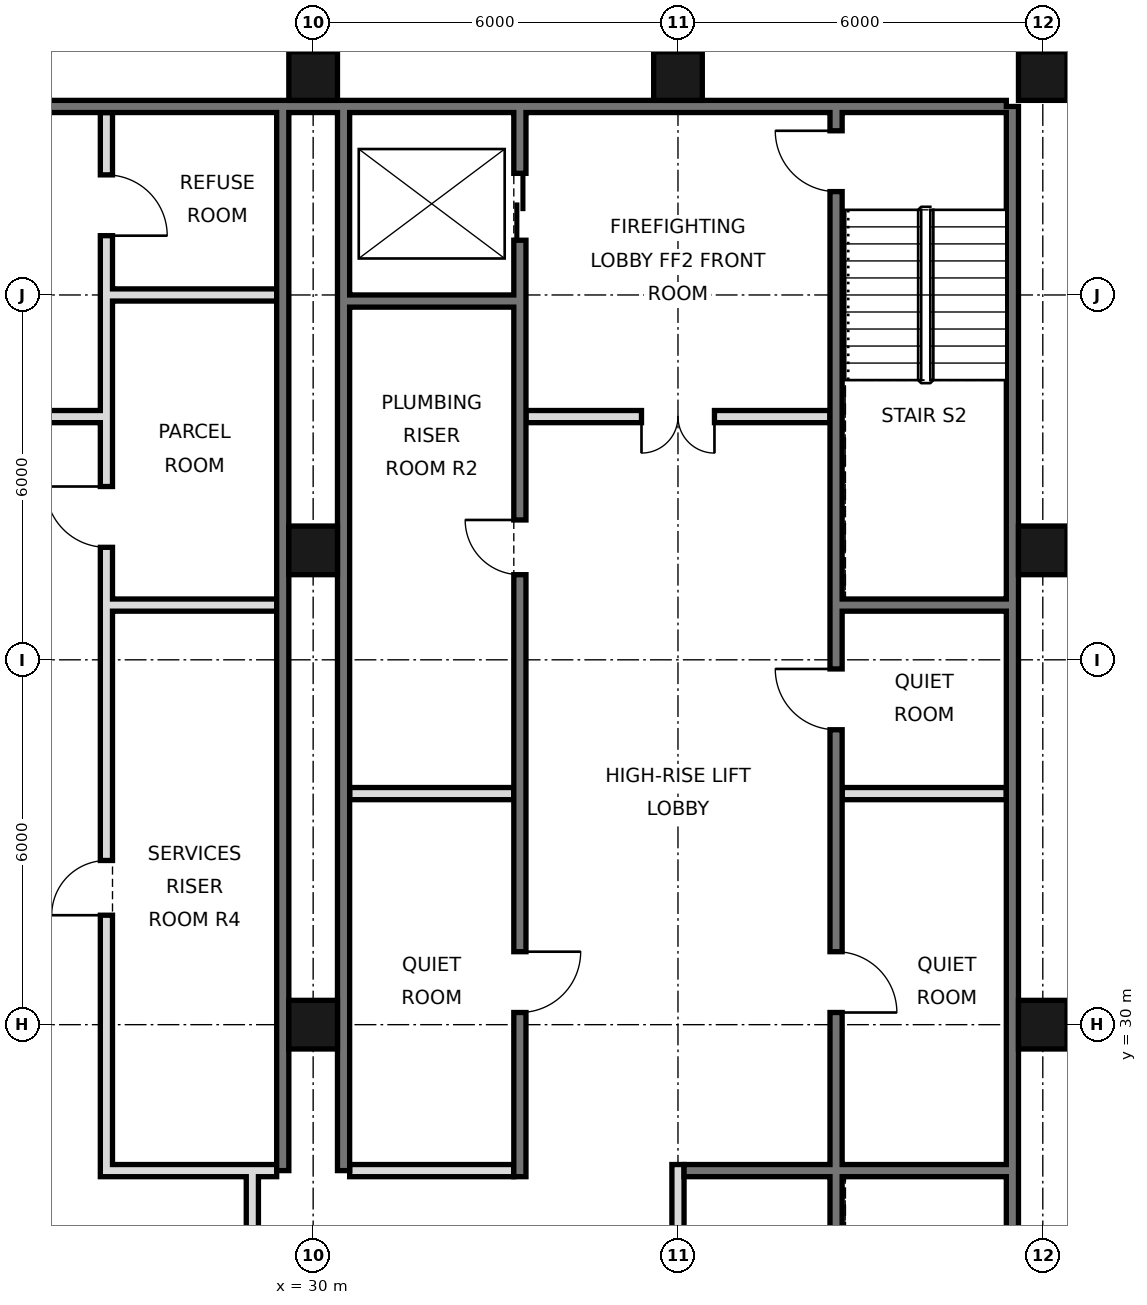
"""IFC4 building model, lengths in metres.
Left out: names, types, materials, properties, quantities, classifications, styles, units other than length and angle.
Written with IfcOpenShell. Run it as: python <this file> out.ifc"""

import sys

from ifc_helpers import new_model, si_unit, direction, frame, frame_2d, origin, origin_2d, place, context, subcontext, project, spatial, rectangle, hollow_rectangle, extrude, element, fill, save


model = new_model("IFC4")
c1 = context("Model", 3, precision=1e-05, world=origin(), true_north=direction((0.0, 1.0)))
c2 = subcontext(c1, "Body", "Model", "MODEL_VIEW")
j1 = project(units=[si_unit("LENGTHUNIT", "METRE"), si_unit("PLANEANGLEUNIT", "RADIAN")], contexts=[c1])
p1 = place(None, origin())
s1 = spatial("IfcSite", under=j1, at=p1, CompositionType="ELEMENT")
p2 = place(p1, origin())
s2 = spatial("IfcBuilding", under=s1, at=p2, CompositionType="ELEMENT")
p3 = place(p2, frame((0.0, 0.0, 123.2)))
s3 = spatial("IfcBuildingStorey", under=s2, at=p3, CompositionType="ELEMENT", Elevation=123.2)
for number, where, z_axis, x_axis in (
    (1, (30.0, 30.0, 0.0), (0.0, 0.0, 1.0), (1.0, 0.0, 0.0)),
    (2, (30.0, 37.8, 0.0), (0.0, 0.0, 1.0), (1.0, 0.0, 0.0)),
    (3, (30.0, 45.6, 0.0), (0.0, 0.0, 1.0), (1.0, 0.0, 0.0)),
    (4, (36.0, 45.6, 0.0), (0.0, 0.0, 1.0), (1.0, 0.0, 0.0)),
    (5, (42.0, 30.0, 0.0), (0.0, 0.0, 1.0), (1.0, 0.0, 0.0)),
    (6, (42.0, 37.8, 0.0), (0.0, 0.0, 1.0), (1.0, 0.0, 0.0)),
    (7, (42.0, 45.6, 0.0), (0.0, 0.0, 1.0), (1.0, 0.0, 0.0)),
):
    element("IfcColumn", number, at=place(p3, frame(where, z_axis=z_axis, x_axis=x_axis)), inside=s3, PredefinedType="COLUMN", context=c2, shape_type="SweptSolid", body=[
        extrude(hollow_rectangle(XDim=0.8, YDim=0.8, WallThickness=0.05, at=origin_2d()), origin(), (0.0, 0.0, 1.0), 3.6),
    ])
p4 = place(p3, frame((41.5, 21.6, 0.0), z_axis=(0.0, 0.0, 1.0), x_axis=(0.0, 1.0, 0.0)))
e8 = element("IfcWall", 8, at=p4, inside=s3, PredefinedType="SOLIDWALL", context=c2, shape_type="SweptSolid", body=[
    extrude(rectangle(XDim=23.5, YDim=0.2, at=frame_2d((11.75, 0.0))), origin(), (0.0, 0.0, 1.0), 3.42),
])
p5 = place(p3, frame((6.6, 45.1, 0.0), z_axis=(0.0, 0.0, 1.0), x_axis=(1.0, 0.0, 0.0)))
e9 = element("IfcWall", 9, at=p5, inside=s3, PredefinedType="SOLIDWALL", context=c2, shape_type="SweptSolid", body=[
    extrude(rectangle(XDim=34.8, YDim=0.2, at=frame_2d((17.4, 0.0))), origin(), (0.0, 0.0, 1.0), 3.42),
])
for number, where, z_axis, x_axis in (
    (10, (29.5, 27.6, 0.0), (0.0, 0.0, 1.0), (0.0, 1.0, 0.0)),
    (11, (30.5, 27.6, 0.0), (0.0, 0.0, 1.0), (0.0, 1.0, 0.0)),
):
    element("IfcWall", number, at=place(p3, frame(where, z_axis=z_axis, x_axis=x_axis)), inside=s3, PredefinedType="SOLIDWALL", context=c2, shape_type="SweptSolid", body=[
        extrude(rectangle(XDim=17.5, YDim=0.2, at=frame_2d((8.75, 0.0))), origin(), (0.0, 0.0, 1.0), 3.42),
    ])
p6 = place(p3, frame((29.0, 21.6, 0.0), z_axis=(0.0, 0.0, 1.0), x_axis=(0.0, 1.0, 0.0)))
e12 = element("IfcWall", 12, at=p6, inside=s3, PredefinedType="PARTITIONING", context=c2, shape_type="SweptSolid", body=[
    extrude(rectangle(XDim=6.0, YDim=0.2, at=frame_2d((3.0, 0.0))), origin(), (0.0, 0.0, 1.0), 3.42),
])
p7 = place(p6, frame((2.1, 0.0, 0.0)))
e13 = element("IfcOpeningElement", 13, at=p7, cuts=e12, PredefinedType="OPENING", context=c2, shape_type="SweptSolid", body=[
    extrude(rectangle(XDim=1.8, YDim=2.1, at=frame_2d((0.9, 1.05))), frame((0.0, 0.11, 0.0), z_axis=(0.0, -1.0, 0.0), x_axis=(1.0, 0.0, 0.0)), (0.0, 0.0, 1.0), 0.22),
])
p8 = place(p3, frame((26.6, 27.5, 0.0), z_axis=(0.0, 0.0, 1.0), x_axis=(0.0, 1.0, 0.0)))
e14 = element("IfcWall", 14, at=p8, inside=s3, PredefinedType="SOLIDWALL", context=c2, shape_type="SweptSolid", body=[
    extrude(rectangle(XDim=17.5, YDim=0.2, at=frame_2d((8.75, 0.0))), origin(), (0.0, 0.0, 1.0), 3.42),
])
p9 = place(p8, frame((4.3, 0.0, 0.0)))
e15 = element("IfcOpeningElement", 15, at=p9, cuts=e14, PredefinedType="OPENING", context=c2, shape_type="SweptSolid", body=[
    extrude(rectangle(XDim=0.9, YDim=2.1, at=frame_2d((0.45, 1.05))), frame((0.0, 0.11, 0.0), z_axis=(0.0, -1.0, 0.0), x_axis=(1.0, 0.0, 0.0)), (0.0, 0.0, 1.0), 0.22),
])
p10 = place(p8, frame((10.35, 0.0, 0.0)))
e16 = element("IfcOpeningElement", 16, at=p10, cuts=e14, PredefinedType="OPENING", context=c2, shape_type="SweptSolid", body=[
    extrude(rectangle(XDim=1.0, YDim=2.1, at=frame_2d((0.5, 1.05))), frame((0.0, 0.11, 0.0), z_axis=(0.0, -1.0, 0.0), x_axis=(1.0, 0.0, 0.0)), (0.0, 0.0, 1.0), 0.22),
])
p11 = place(p8, frame((15.475, 0.0, 0.0)))
e17 = element("IfcOpeningElement", 17, at=p11, cuts=e14, PredefinedType="OPENING", context=c2, shape_type="SweptSolid", body=[
    extrude(rectangle(XDim=1.0, YDim=2.1, at=frame_2d((0.5, 1.05))), frame((0.0, 0.11, 0.0), z_axis=(0.0, -1.0, 0.0), x_axis=(1.0, 0.0, 0.0)), (0.0, 0.0, 1.0), 0.22),
])
p12 = place(p3, frame((33.4, 27.5, 0.0), z_axis=(0.0, 0.0, 1.0), x_axis=(0.0, 1.0, 0.0)))
e18 = element("IfcWall", 18, at=p12, inside=s3, PredefinedType="SOLIDWALL", context=c2, shape_type="SweptSolid", body=[
    extrude(rectangle(XDim=17.5, YDim=0.2, at=frame_2d((8.75, 0.0))), origin(), (0.0, 0.0, 1.0), 3.42),
])
p13 = place(p12, frame((15.4, 0.0, 0.0)))
e19 = element("IfcOpeningElement", 19, at=p13, cuts=e18, PredefinedType="OPENING", context=c2, shape_type="SweptSolid", body=[
    extrude(rectangle(XDim=1.1, YDim=2.1, at=frame_2d((0.55, 1.05))), frame((0.0, 0.11, 0.0), z_axis=(0.0, -1.0, 0.0), x_axis=(1.0, 0.0, 0.0)), (0.0, 0.0, 1.0), 0.22),
])
p14 = place(p12, frame((2.7, 0.0, 0.0)))
e20 = element("IfcOpeningElement", 20, at=p14, cuts=e18, PredefinedType="OPENING", context=c2, shape_type="SweptSolid", body=[
    extrude(rectangle(XDim=1.0, YDim=2.1, at=frame_2d((0.5, 1.05))), frame((0.0, 0.11, 0.0), z_axis=(0.0, -1.0, 0.0), x_axis=(1.0, 0.0, 0.0)), (0.0, 0.0, 1.0), 0.22),
])
p15 = place(p12, frame((9.9, 0.0, 0.0)))
e21 = element("IfcOpeningElement", 21, at=p15, cuts=e18, PredefinedType="OPENING", context=c2, shape_type="SweptSolid", body=[
    extrude(rectangle(XDim=0.9, YDim=2.1, at=frame_2d((0.45, 1.05))), frame((0.0, 0.11, 0.0), z_axis=(0.0, -1.0, 0.0), x_axis=(1.0, 0.0, 0.0)), (0.0, 0.0, 1.0), 0.22),
])
p16 = place(p3, frame((36.0, 21.6, 0.0), z_axis=(0.0, 0.0, 1.0), x_axis=(0.0, 1.0, 0.0)))
e22 = element("IfcWall", 22, at=p16, inside=s3, PredefinedType="PARTITIONING", context=c2, shape_type="SweptSolid", body=[
    extrude(rectangle(XDim=6.1, YDim=0.2, at=frame_2d((3.05, 0.0))), origin(), (0.0, 0.0, 1.0), 3.42),
])
p17 = place(p3, frame((38.6, 21.6, 0.0), z_axis=(0.0, 0.0, 1.0), x_axis=(0.0, 1.0, 0.0)))
e23 = element("IfcWall", 23, at=p17, inside=s3, PredefinedType="SOLIDWALL", context=c2, shape_type="SweptSolid", body=[
    extrude(rectangle(XDim=23.4, YDim=0.2, at=frame_2d((11.7, 0.0))), origin(), (0.0, 0.0, 1.0), 3.42),
])
p18 = place(p17, frame((8.6, 0.0, 0.0)))
e24 = element("IfcOpeningElement", 24, at=p18, cuts=e23, PredefinedType="OPENING", context=c2, shape_type="SweptSolid", body=[
    extrude(rectangle(XDim=1.0, YDim=2.1, at=frame_2d((0.5, 1.05))), frame((0.0, 0.11, 0.0), z_axis=(0.0, -1.0, 0.0), x_axis=(1.0, 0.0, 0.0)), (0.0, 0.0, 1.0), 0.22),
])
p19 = place(p17, frame((13.25, 0.0, 0.0)))
e25 = element("IfcOpeningElement", 25, at=p19, cuts=e23, PredefinedType="OPENING", context=c2, shape_type="SweptSolid", body=[
    extrude(rectangle(XDim=1.0, YDim=2.1, at=frame_2d((0.5, 1.05))), frame((0.0, 0.11, 0.0), z_axis=(0.0, -1.0, 0.0), x_axis=(1.0, 0.0, 0.0)), (0.0, 0.0, 1.0), 0.22),
])
p20 = place(p17, frame((22.1, 0.0, 0.0)))
e26 = element("IfcOpeningElement", 26, at=p20, cuts=e23, PredefinedType="OPENING", context=c2, shape_type="SweptSolid", body=[
    extrude(rectangle(XDim=1.0, YDim=2.1, at=frame_2d((0.5, 1.05))), frame((0.0, 0.11, 0.0), z_axis=(0.0, -1.0, 0.0), x_axis=(1.0, 0.0, 0.0)), (0.0, 0.0, 1.0), 0.22),
])
p21 = place(p17, frame((0.175, 0.0, 0.0)))
e27 = element("IfcOpeningElement", 27, at=p21, cuts=e23, PredefinedType="OPENING", context=c2, shape_type="SweptSolid", body=[
    extrude(rectangle(XDim=0.9, YDim=2.1, at=frame_2d((0.45, 1.05))), frame((0.0, 0.11, 0.0), z_axis=(0.0, -1.0, 0.0), x_axis=(1.0, 0.0, 0.0)), (0.0, 0.0, 1.0), 0.22),
])
p22 = place(p3, frame((26.7, 27.6, 0.0), z_axis=(0.0, 0.0, 1.0), x_axis=(1.0, 0.0, 0.0)))
e28 = element("IfcWall", 28, at=p22, inside=s3, PredefinedType="SOLIDWALL", context=c2, shape_type="SweptSolid", body=[
    extrude(rectangle(XDim=2.7, YDim=0.2, at=frame_2d((1.35, 0.0))), origin(), (0.0, 0.0, 1.0), 3.42),
])
p23 = place(p3, frame((30.6, 27.6, 0.0), z_axis=(0.0, 0.0, 1.0), x_axis=(1.0, 0.0, 0.0)))
e29 = element("IfcWall", 29, at=p23, inside=s3, PredefinedType="PARTITIONING", context=c2, shape_type="SweptSolid", body=[
    extrude(rectangle(XDim=2.7, YDim=0.2, at=frame_2d((1.35, 0.0))), origin(), (0.0, 0.0, 1.0), 3.42),
])
p24 = place(p3, frame((36.1, 27.6, 0.0), z_axis=(0.0, 0.0, 1.0), x_axis=(1.0, 0.0, 0.0)))
e30 = element("IfcWall", 30, at=p24, inside=s3, PredefinedType="SOLIDWALL", context=c2, shape_type="SweptSolid", body=[
    extrude(rectangle(XDim=5.3, YDim=0.2, at=frame_2d((2.65, 0.0))), origin(), (0.0, 0.0, 1.0), 3.42),
])
p25 = place(p3, frame((30.6, 33.8, 0.0), z_axis=(0.0, 0.0, 1.0), x_axis=(1.0, 0.0, 0.0)))
e31 = element("IfcWall", 31, at=p25, inside=s3, PredefinedType="SOLIDWALL", context=c2, shape_type="SweptSolid", body=[
    extrude(rectangle(XDim=2.7, YDim=0.2, at=frame_2d((1.35, 0.0))), origin(), (0.0, 0.0, 1.0), 3.42),
])
p26 = place(p3, frame((38.7, 33.8, 0.0), z_axis=(0.0, 0.0, 1.0), x_axis=(1.0, 0.0, 0.0)))
e32 = element("IfcWall", 32, at=p26, inside=s3, PredefinedType="PARTITIONING", context=c2, shape_type="SweptSolid", body=[
    extrude(rectangle(XDim=2.7, YDim=0.2, at=frame_2d((1.35, 0.0))), origin(), (0.0, 0.0, 1.0), 3.42),
])
for number, where, z_axis, x_axis in (
    (33, (26.7, 36.9, 0.0), (0.0, 0.0, 1.0), (1.0, 0.0, 0.0)),
    (34, (38.7, 36.9, 0.0), (0.0, 0.0, 1.0), (1.0, 0.0, 0.0)),
):
    element("IfcWall", number, at=place(p3, frame(where, z_axis=z_axis, x_axis=x_axis)), inside=s3, PredefinedType="SOLIDWALL", context=c2, shape_type="SweptSolid", body=[
        extrude(rectangle(XDim=2.7, YDim=0.2, at=frame_2d((1.35, 0.0))), origin(), (0.0, 0.0, 1.0), 3.42),
    ])
p27 = place(p3, frame((21.5, 40.0, 0.0), z_axis=(0.0, 0.0, 1.0), x_axis=(1.0, 0.0, 0.0)))
e35 = element("IfcWall", 35, at=p27, inside=s3, PredefinedType="PARTITIONING", context=c2, shape_type="SweptSolid", body=[
    extrude(rectangle(XDim=5.0, YDim=0.2, at=frame_2d((2.5, 0.0))), origin(), (0.0, 0.0, 1.0), 3.42),
])
p28 = place(p27, frame((1.9, 0.0, 0.0)))
e36 = element("IfcOpeningElement", 36, at=p28, cuts=e35, PredefinedType="OPENING", context=c2, shape_type="SweptSolid", body=[
    extrude(rectangle(XDim=1.2, YDim=2.1, at=frame_2d((0.6, 1.05))), frame((0.0, 0.11, 0.0), z_axis=(0.0, -1.0, 0.0), x_axis=(1.0, 0.0, 0.0)), (0.0, 0.0, 1.0), 0.22),
])
p29 = place(p3, frame((33.5, 40.0, 0.0), z_axis=(0.0, 0.0, 1.0), x_axis=(1.0, 0.0, 0.0)))
e37 = element("IfcWall", 37, at=p29, inside=s3, PredefinedType="PARTITIONING", context=c2, shape_type="SweptSolid", body=[
    extrude(rectangle(XDim=5.0, YDim=0.2, at=frame_2d((2.5, 0.0))), origin(), (0.0, 0.0, 1.0), 3.42),
])
p30 = place(p29, frame((1.9, 0.0, 0.0)))
e38 = element("IfcOpeningElement", 38, at=p30, cuts=e37, PredefinedType="OPENING", context=c2, shape_type="SweptSolid", body=[
    extrude(rectangle(XDim=1.2, YDim=2.1, at=frame_2d((0.6, 1.05))), frame((0.0, 0.11, 0.0), z_axis=(0.0, -1.0, 0.0), x_axis=(1.0, 0.0, 0.0)), (0.0, 0.0, 1.0), 0.22),
])
p31 = place(p3, frame((30.6, 41.9, 0.0), z_axis=(0.0, 0.0, 1.0), x_axis=(1.0, 0.0, 0.0)))
e39 = element("IfcWall", 39, at=p31, inside=s3, PredefinedType="SOLIDWALL", context=c2, shape_type="SweptSolid", body=[
    extrude(rectangle(XDim=2.7, YDim=0.2, at=frame_2d((1.35, 0.0))), origin(), (0.0, 0.0, 1.0), 3.42),
])
p32 = place(p3, frame((26.7, 42.0, 0.0), z_axis=(0.0, 0.0, 1.0), x_axis=(1.0, 0.0, 0.0)))
e40 = element("IfcWall", 40, at=p32, inside=s3, PredefinedType="PARTITIONING", context=c2, shape_type="SweptSolid", body=[
    extrude(rectangle(XDim=2.7, YDim=0.2, at=frame_2d((1.35, 0.0))), origin(), (0.0, 0.0, 1.0), 3.42),
])
p33 = place(p30, frame((1.2, 0.0, 0.0), z_axis=(0.0, 0.0, 1.0), x_axis=(-1.0, 0.0, 0.0)))
e41 = element("IfcDoor", 41, at=p33, inside=s3, OperationType="DOUBLE_DOOR_SINGLE_SWING", PredefinedType="DOOR", context=c2, shape_type="SweptSolid", body=[
    extrude(rectangle(XDim=1.2, YDim=2.1, at=frame_2d((0.6, 1.05))), frame((0.0, 0.025, 0.0), z_axis=(0.0, -1.0, 0.0), x_axis=(1.0, 0.0, 0.0)), (0.0, 0.0, 1.0), 0.05),
])
fill(e38, e41)
p34 = place(p13, origin())
e42 = element("IfcDoor", 42, at=p34, inside=s3, OperationType="DOUBLE_DOOR_SLIDING", PredefinedType="DOOR", context=c2, shape_type="SweptSolid", body=[
    extrude(rectangle(XDim=1.1, YDim=2.1, at=frame_2d((0.55, 1.05))), frame((0.0, 0.025, 0.0), z_axis=(0.0, -1.0, 0.0), x_axis=(1.0, 0.0, 0.0)), (0.0, 0.0, 1.0), 0.05),
])
fill(e19, e42)
p35 = place(p18, frame((1.0, 0.0, 0.0), z_axis=(0.0, 0.0, 1.0), x_axis=(-1.0, 0.0, 0.0)))
e43 = element("IfcDoor", 43, at=p35, inside=s3, OperationType="SINGLE_SWING_RIGHT", PredefinedType="DOOR", context=c2, shape_type="SweptSolid", body=[
    extrude(rectangle(XDim=1.0, YDim=2.1, at=frame_2d((0.5, 1.05))), frame((0.0, 0.025, 0.0), z_axis=(0.0, -1.0, 0.0), x_axis=(1.0, 0.0, 0.0)), (0.0, 0.0, 1.0), 0.05),
])
fill(e24, e43)
p36 = place(p19, frame((1.0, 0.0, 0.0), z_axis=(0.0, 0.0, 1.0), x_axis=(-1.0, 0.0, 0.0)))
e44 = element("IfcDoor", 44, at=p36, inside=s3, OperationType="SINGLE_SWING_LEFT", PredefinedType="DOOR", context=c2, shape_type="SweptSolid", body=[
    extrude(rectangle(XDim=1.0, YDim=2.1, at=frame_2d((0.5, 1.05))), frame((0.0, 0.025, 0.0), z_axis=(0.0, -1.0, 0.0), x_axis=(1.0, 0.0, 0.0)), (0.0, 0.0, 1.0), 0.05),
])
fill(e25, e44)
p37 = place(p14, origin())
e45 = element("IfcDoor", 45, at=p37, inside=s3, OperationType="SINGLE_SWING_RIGHT", PredefinedType="DOOR", context=c2, shape_type="SweptSolid", body=[
    extrude(rectangle(XDim=1.0, YDim=2.1, at=frame_2d((0.5, 1.05))), frame((0.0, 0.025, 0.0), z_axis=(0.0, -1.0, 0.0), x_axis=(1.0, 0.0, 0.0)), (0.0, 0.0, 1.0), 0.05),
])
fill(e20, e45)
p38 = place(p20, frame((1.0, 0.0, 0.0), z_axis=(0.0, 0.0, 1.0), x_axis=(-1.0, 0.0, 0.0)))
e46 = element("IfcDoor", 46, at=p38, inside=s3, OperationType="SINGLE_SWING_LEFT", PredefinedType="DOOR", context=c2, shape_type="SweptSolid", body=[
    extrude(rectangle(XDim=1.0, YDim=2.1, at=frame_2d((0.5, 1.05))), frame((0.0, 0.025, 0.0), z_axis=(0.0, -1.0, 0.0), x_axis=(1.0, 0.0, 0.0)), (0.0, 0.0, 1.0), 0.05),
])
fill(e26, e46)
p39 = place(p15, frame((0.9, 0.0, 0.0), z_axis=(0.0, 0.0, 1.0), x_axis=(-1.0, 0.0, 0.0)))
e47 = element("IfcDoor", 47, at=p39, inside=s3, OperationType="SINGLE_SWING_LEFT", PredefinedType="DOOR", context=c2, shape_type="SweptSolid", body=[
    extrude(rectangle(XDim=0.9, YDim=2.1, at=frame_2d((0.45, 1.05))), frame((0.0, 0.025, 0.0), z_axis=(0.0, -1.0, 0.0), x_axis=(1.0, 0.0, 0.0)), (0.0, 0.0, 1.0), 0.05),
])
fill(e21, e47)
p40 = place(p9, origin())
e48 = element("IfcDoor", 48, at=p40, inside=s3, OperationType="SINGLE_SWING_LEFT", PredefinedType="DOOR", context=c2, shape_type="SweptSolid", body=[
    extrude(rectangle(XDim=0.9, YDim=2.1, at=frame_2d((0.45, 1.05))), frame((0.0, 0.025, 0.0), z_axis=(0.0, -1.0, 0.0), x_axis=(1.0, 0.0, 0.0)), (0.0, 0.0, 1.0), 0.05),
])
fill(e15, e48)
p41 = place(p10, frame((1.0, 0.0, 0.0), z_axis=(0.0, 0.0, 1.0), x_axis=(-1.0, 0.0, 0.0)))
e49 = element("IfcDoor", 49, at=p41, inside=s3, OperationType="SINGLE_SWING_LEFT", PredefinedType="DOOR", context=c2, shape_type="SweptSolid", body=[
    extrude(rectangle(XDim=1.0, YDim=2.1, at=frame_2d((0.5, 1.05))), frame((0.0, 0.025, 0.0), z_axis=(0.0, -1.0, 0.0), x_axis=(1.0, 0.0, 0.0)), (0.0, 0.0, 1.0), 0.05),
])
fill(e16, e49)
p42 = place(p11, frame((1.0, 0.0, 0.0), z_axis=(0.0, 0.0, 1.0), x_axis=(-1.0, 0.0, 0.0)))
e50 = element("IfcDoor", 50, at=p42, inside=s3, OperationType="SINGLE_SWING_RIGHT", PredefinedType="DOOR", context=c2, shape_type="SweptSolid", body=[
    extrude(rectangle(XDim=1.0, YDim=2.1, at=frame_2d((0.5, 1.05))), frame((0.0, 0.025, 0.0), z_axis=(0.0, -1.0, 0.0), x_axis=(1.0, 0.0, 0.0)), (0.0, 0.0, 1.0), 0.05),
])
fill(e17, e50)
save(model, sys.argv[1])
